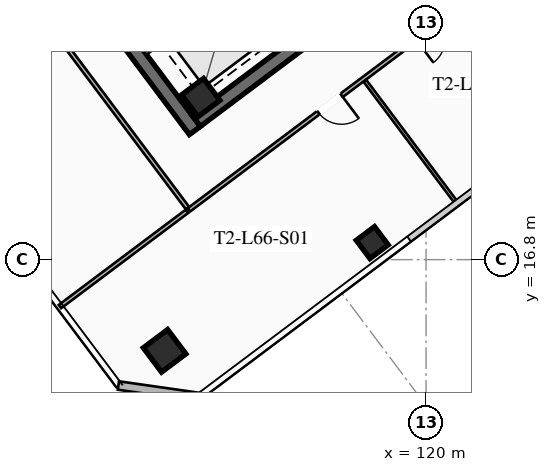
"""IFC4 building model, lengths in metres.
Left out: names, types, materials, properties, quantities, classifications, styles, units other than length and angle.
Written with IfcOpenShell. Run it as: python <this file> out.ifc"""

import sys

from ifc_helpers import new_model, si_unit, direction, frame, frame_2d, origin, origin_2d, place, context, subcontext, project, spatial, rectangle, hollow_rectangle, extrude, element, fill, save


model = new_model("IFC4")
c1 = context("Model", 3, precision=1e-05, world=origin(), true_north=direction((0.0, 1.0)))
c2 = subcontext(c1, "Body", "Model", "MODEL_VIEW")
j1 = project(units=[si_unit("LENGTHUNIT", "METRE"), si_unit("PLANEANGLEUNIT", "RADIAN")], contexts=[c1])
p1 = place(None, origin())
s1 = spatial("IfcSite", under=j1, at=p1, CompositionType="ELEMENT")
p2 = place(p1, origin())
s2 = spatial("IfcBuilding", under=s1, at=p2, CompositionType="ELEMENT")
p3 = place(p2, frame((0.0, 0.0, 243.25)))
s3 = spatial("IfcBuildingStorey", under=s2, at=p3, CompositionType="ELEMENT", Elevation=243.25)
p4 = place(p3, frame((112.396, 21.047, 0.0), z_axis=(0.0, 0.0, 1.0), x_axis=(-0.600005007985, 0.799996243986, 0.0)))
e1 = element("IfcWall", 1, at=p4, inside=s3, PredefinedType="SHEAR", context=c2, shape_type="SweptSolid", body=[
    extrude(rectangle(XDim=15.6, YDim=0.45, at=frame_2d((7.8, 0.0))), origin(), (0.0, 0.0, 1.0), 3.55),
])
p5 = place(p3, frame((124.649, 30.518, 0.0), z_axis=(0.0, 0.0, 1.0), x_axis=(-0.8, -0.6, 0.0)))
e2 = element("IfcWall", 2, at=p5, inside=s3, PredefinedType="SHEAR", context=c2, shape_type="SweptSolid", body=[
    extrude(rectangle(XDim=15.26, YDim=0.45, at=frame_2d((7.63, 0.0))), origin(), (0.0, 0.0, 1.0), 3.55),
])
p6 = place(p5, frame((9.33, 0.0, 0.0)))
e3 = element("IfcOpeningElement", 3, at=p6, cuts=e2, PredefinedType="OPENING", context=c2, shape_type="SweptSolid", body=[
    extrude(rectangle(XDim=1.25, YDim=2.25, at=frame_2d((0.625, 1.125))), frame((0.0, 0.235, 0.0), z_axis=(0.0, -1.0, 0.0), x_axis=(1.0, 0.0, 0.0)), (0.0, 0.0, 1.0), 0.47),
])
p7 = place(p5, frame((4.28, 0.0, 0.0)))
e4 = element("IfcOpeningElement", 4, at=p7, cuts=e2, PredefinedType="OPENING", context=c2, shape_type="SweptSolid", body=[
    extrude(rectangle(XDim=1.25, YDim=2.25, at=frame_2d((0.625, 1.125))), frame((0.0, 0.235, 0.0), z_axis=(0.0, -1.0, 0.0), x_axis=(1.0, 0.0, 0.0)), (0.0, 0.0, 1.0), 0.47),
])
p8 = place(p3, frame((112.59, 22.13, 0.0), z_axis=(0.0, 0.0, 1.0), x_axis=(0.799999996291, 0.600000004945, 0.0)))
e5 = element("IfcColumn", 5, at=p8, inside=s3, PredefinedType="COLUMN", context=c2, shape_type="SweptSolid", body=[
    extrude(hollow_rectangle(XDim=0.9, YDim=0.9, WallThickness=0.04, at=origin_2d()), origin(), (0.0, 0.0, 1.0), 3.25),
])
p9 = place(p3, frame((111.4, 13.8, 0.0), z_axis=(0.0, 0.0, 1.0), x_axis=(0.799999996291, 0.600000004945, 0.0)))
e6 = element("IfcColumn", 6, at=p9, inside=s3, PredefinedType="COLUMN", context=c2, shape_type="SweptSolid", body=[
    extrude(hollow_rectangle(XDim=1.0, YDim=1.0, WallThickness=0.04, at=origin_2d()), origin(), (0.0, 0.0, 1.0), 3.25),
])
p10 = place(p3, frame((118.23, 17.36, 0.0), z_axis=(0.0, 0.0, 1.0), x_axis=(0.799999996291, 0.600000004945, 0.0)))
e7 = element("IfcColumn", 7, at=p10, inside=s3, PredefinedType="COLUMN", context=c2, shape_type="SweptSolid", body=[
    extrude(hollow_rectangle(XDim=0.75, YDim=0.75, WallThickness=0.032, at=origin_2d()), origin(), (0.0, 0.0, 1.0), 3.25),
])
p11 = place(p3, frame((112.54, 12.28, 0.0), z_axis=(0.0, 0.0, 1.0), x_axis=(-0.989956760759, 0.141370477216, 0.0)))
e8 = element("IfcWall", 8, at=p11, inside=s3, PredefinedType="SOLIDWALL", context=c2, shape_type="SweptSolid", body=[
    extrude(rectangle(XDim=2.687, YDim=0.28, at=frame_2d((1.344, 0.0))), origin(), (0.0, 0.0, 1.0), 3.25),
])
p12 = place(p3, frame((110.746, 23.622, 0.0), z_axis=(0.0, 0.0, 1.0), x_axis=(0.800008183455, 0.599989088572, 0.0)))
e9 = element("IfcWall", 9, at=p12, inside=s3, PredefinedType="SOLIDWALL", context=c2, shape_type="SweptSolid", body=[
    extrude(rectangle(XDim=3.58, YDim=0.2, at=frame_2d((1.79, 0.0))), origin(), (0.0, 0.0, 1.0), 3.25),
])
p13 = place(p3, frame((123.382, 26.824, 0.0), z_axis=(0.0, 0.0, 1.0), x_axis=(-0.800004191227, -0.599994411657, 0.0)))
e10 = element("IfcWall", 10, at=p13, inside=s3, PredefinedType="PARTITIONING", context=c2, shape_type="SweptSolid", body=[
    extrude(rectangle(XDim=13.98, YDim=0.135, at=frame_2d((6.99, 0.0))), origin(), (0.0, 0.0, 1.0), 2.393),
])
p14 = place(p13, frame((7.701, 0.0, 0.0)))
e11 = element("IfcOpeningElement", 11, at=p14, cuts=e10, PredefinedType="OPENING", context=c2, shape_type="SweptSolid", body=[
    extrude(rectangle(XDim=0.95, YDim=2.05, at=frame_2d((0.475, 1.025))), frame((0.0, 0.077, 0.0), z_axis=(0.0, -1.0, 0.0), x_axis=(1.0, 0.0, 0.0)), (0.0, 0.0, 1.0), 0.155),
])
p15 = place(p13, frame((3.688, 0.0, 0.0)))
e12 = element("IfcOpeningElement", 12, at=p15, cuts=e10, PredefinedType="OPENING", context=c2, shape_type="SweptSolid", body=[
    extrude(rectangle(XDim=0.95, YDim=2.05, at=frame_2d((0.475, 1.025))), frame((0.0, 0.077, 0.0), z_axis=(0.0, -1.0, 0.0), x_axis=(1.0, 0.0, 0.0)), (0.0, 0.0, 1.0), 0.155),
])
p16 = place(p3, frame((121.008, 18.656, 0.0), z_axis=(0.0, 0.0, 1.0), x_axis=(-0.600015531756, 0.799988350947, 0.0)))
e13 = element("IfcWall", 13, at=p16, inside=s3, PredefinedType="PARTITIONING", context=c2, shape_type="SweptSolid", body=[
    extrude(rectangle(XDim=5.03, YDim=0.11, at=frame_2d((2.515, 0.0))), origin(), (0.0, 0.0, 1.0), 2.393),
])
p17 = place(p3, frame((112.15, 18.5, 0.0), z_axis=(0.0, 0.0, 1.0), x_axis=(-0.599998104681, 0.800001421485, 0.0)))
e14 = element("IfcWall", 14, at=p17, inside=s3, PredefinedType="PARTITIONING", context=c2, shape_type="SweptSolid", body=[
    extrude(rectangle(XDim=20.61, YDim=0.135, at=frame_2d((10.305, 0.0))), origin(), (0.0, 0.0, 1.0), 2.393),
])
p18 = place(p17, frame((19.36, 0.0, 0.0)))
e15 = element("IfcOpeningElement", 15, at=p18, cuts=e14, PredefinedType="OPENING", context=c2, shape_type="SweptSolid", body=[
    extrude(rectangle(XDim=0.95, YDim=2.05, at=frame_2d((0.475, 1.025))), frame((0.0, 0.077, 0.0), z_axis=(0.0, -1.0, 0.0), x_axis=(1.0, 0.0, 0.0)), (0.0, 0.0, 1.0), 0.155),
])
p19 = place(p3, frame((107.958, 15.256, 0.0), z_axis=(0.0, 0.0, 1.0), x_axis=(0.800016837221, 0.599977549715, 0.0)))
e16 = element("IfcWall", 16, at=p19, inside=s3, PredefinedType="PARTITIONING", context=c2, shape_type="SweptSolid", body=[
    extrude(rectangle(XDim=5.22, YDim=0.135, at=frame_2d((2.61, 0.0))), origin(), (0.0, 0.0, 1.0), 2.393),
])
p20 = place(p14, origin())
e17 = element("IfcDoor", 17, at=p20, inside=s3, OperationType="SINGLE_SWING_LEFT", PredefinedType="DOOR", context=c2, shape_type="SweptSolid", body=[
    extrude(rectangle(XDim=0.95, YDim=2.05, at=frame_2d((0.475, 1.025))), frame((0.0, 0.025, 0.0), z_axis=(0.0, -1.0, 0.0), x_axis=(1.0, 0.0, 0.0)), (0.0, 0.0, 1.0), 0.05),
])
fill(e11, e17)
save(model, sys.argv[1])
